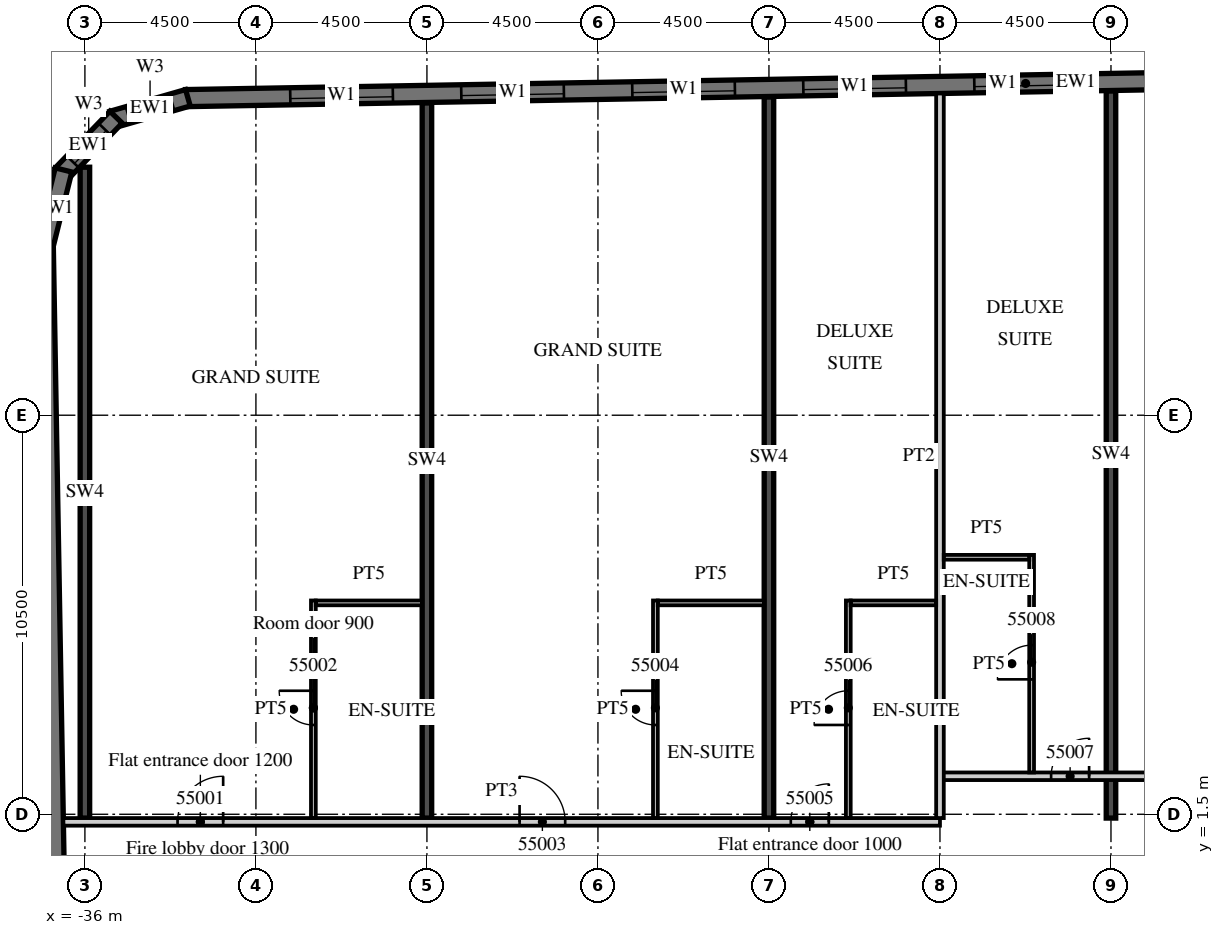
"""IFC4 building model, lengths in metres.
Left out: names, types, materials, properties, quantities, classifications, styles, units other than length and angle.
Written with IfcOpenShell. Run it as: python <this file> out.ifc"""

import sys

from ifc_helpers import new_model, si_unit, direction, frame, frame_2d, origin, place, context, subcontext, project, spatial, polyline, rectangle, outline, extrude, element, fill, save


model = new_model("IFC4")
c1 = context("Model", 3, precision=1e-05, world=origin(), true_north=direction((0.0, 1.0)))
c2 = subcontext(c1, "Body", "Model", "MODEL_VIEW")
j1 = project(units=[si_unit("LENGTHUNIT", "METRE"), si_unit("PLANEANGLEUNIT", "RADIAN")], contexts=[c1])
p1 = place(None, origin())
s1 = spatial("IfcSite", under=j1, at=p1, CompositionType="ELEMENT")
p2 = place(p1, origin())
s2 = spatial("IfcBuilding", under=s1, at=p2, CompositionType="ELEMENT")
p3 = place(p2, frame((0.0, 0.0, 227.6)))
s3 = spatial("IfcBuildingStorey", under=s2, at=p3, CompositionType="ELEMENT", Elevation=227.6)
p4 = place(p3, frame((-36.0, 1.4, 0.0), z_axis=(0.0, 0.0, 1.0), x_axis=(0.0, 1.0, 0.0)))
e1 = element("IfcWall", 1, at=p4, inside=s3, PredefinedType="SHEAR", context=c2, shape_type="SweptSolid", body=[
    extrude(rectangle(XDim=17.125, YDim=0.25, at=frame_2d((8.563, 0.0))), origin(), (0.0, 0.0, 1.0), 3.3),
])
p5 = place(p3, frame((-27.0, 1.4, 0.0), z_axis=(0.0, 0.0, 1.0), x_axis=(0.0, 1.0, 0.0)))
e2 = element("IfcWall", 2, at=p5, inside=s3, PredefinedType="SHEAR", context=c2, shape_type="SweptSolid", body=[
    extrude(rectangle(XDim=18.817, YDim=0.25, at=frame_2d((9.409, 0.0))), origin(), (0.0, 0.0, 1.0), 3.3),
])
p6 = place(p3, frame((-18.0, 1.4, 0.0), z_axis=(0.0, 0.0, 1.0), x_axis=(0.0, 1.0, 0.0)))
e3 = element("IfcWall", 3, at=p6, inside=s3, PredefinedType="SHEAR", context=c2, shape_type="SweptSolid", body=[
    extrude(rectangle(XDim=18.974, YDim=0.25, at=frame_2d((9.487, 0.0))), origin(), (0.0, 0.0, 1.0), 3.3),
])
p7 = place(p3, frame((-9.0, 1.4, 0.0), z_axis=(0.0, 0.0, 1.0), x_axis=(0.0, 1.0, 0.0)))
e4 = element("IfcWall", 4, at=p7, inside=s3, PredefinedType="SHEAR", context=c2, shape_type="SweptSolid", body=[
    extrude(rectangle(XDim=19.132, YDim=0.25, at=frame_2d((9.566, 0.0))), origin(), (0.0, 0.0, 1.0), 3.3),
])
p8 = place(p3, frame((-37.057, 16.503, 0.0), z_axis=(0.0, 0.0, 1.0), x_axis=(0.017452279857, -0.999847697366, 0.0)))
e5 = element("IfcWall", 5, at=p8, inside=s3, PredefinedType="SOLIDWALL", context=c2, shape_type="SweptSolid", body=[
    extrude(rectangle(XDim=33.0, YDim=0.45, at=frame_2d((16.5, 0.0))), origin(), (0.0, 0.0, 1.0), 3.02),
])
p9 = place(p3, frame((13.504, 21.161, 0.0), z_axis=(0.0, 0.0, 1.0), x_axis=(-0.999847763257, -0.017448504532, 0.0)))
e6 = element("IfcWall", 6, at=p9, inside=s3, PredefinedType="SOLIDWALL", context=c2, shape_type="SweptSolid", body=[
    extrude(rectangle(XDim=46.859, YDim=0.45, at=frame_2d((23.43, 0.0))), origin(), (0.0, 0.0, 1.0), 3.02),
])
p10 = place(p9, frame((0.9, 0.0, 0.45)))
e7 = element("IfcOpeningElement", 7, at=p10, cuts=e6, PredefinedType="OPENING", context=c2, shape_type="SweptSolid", body=[
    extrude(rectangle(XDim=2.7, YDim=2.25, at=frame_2d((1.35, 1.125))), frame((0.0, 0.235, 0.0), z_axis=(0.0, -1.0, 0.0), x_axis=(1.0, 0.0, 0.0)), (0.0, 0.0, 1.0), 0.47),
])
p11 = place(p9, frame((5.401, 0.0, 0.45)))
e8 = element("IfcOpeningElement", 8, at=p11, cuts=e6, PredefinedType="OPENING", context=c2, shape_type="SweptSolid", body=[
    extrude(rectangle(XDim=2.7, YDim=2.25, at=frame_2d((1.35, 1.125))), frame((0.0, 0.235, 0.0), z_axis=(0.0, -1.0, 0.0), x_axis=(1.0, 0.0, 0.0)), (0.0, 0.0, 1.0), 0.47),
])
p12 = place(p9, frame((9.902, 0.0, 0.45)))
e9 = element("IfcOpeningElement", 9, at=p12, cuts=e6, PredefinedType="OPENING", context=c2, shape_type="SweptSolid", body=[
    extrude(rectangle(XDim=2.7, YDim=2.25, at=frame_2d((1.35, 1.125))), frame((0.0, 0.235, 0.0), z_axis=(0.0, -1.0, 0.0), x_axis=(1.0, 0.0, 0.0)), (0.0, 0.0, 1.0), 0.47),
])
p13 = place(p9, frame((14.402, 0.0, 0.45)))
e10 = element("IfcOpeningElement", 10, at=p13, cuts=e6, PredefinedType="OPENING", context=c2, shape_type="SweptSolid", body=[
    extrude(rectangle(XDim=2.7, YDim=2.25, at=frame_2d((1.35, 1.125))), frame((0.0, 0.235, 0.0), z_axis=(0.0, -1.0, 0.0), x_axis=(1.0, 0.0, 0.0)), (0.0, 0.0, 1.0), 0.47),
])
p14 = place(p9, frame((18.903, 0.0, 0.45)))
e11 = element("IfcOpeningElement", 11, at=p14, cuts=e6, PredefinedType="OPENING", context=c2, shape_type="SweptSolid", body=[
    extrude(rectangle(XDim=2.7, YDim=2.25, at=frame_2d((1.35, 1.125))), frame((0.0, 0.235, 0.0), z_axis=(0.0, -1.0, 0.0), x_axis=(1.0, 0.0, 0.0)), (0.0, 0.0, 1.0), 0.47),
])
p15 = place(p9, frame((23.404, 0.0, 0.45)))
e12 = element("IfcOpeningElement", 12, at=p15, cuts=e6, PredefinedType="OPENING", context=c2, shape_type="SweptSolid", body=[
    extrude(rectangle(XDim=2.7, YDim=2.25, at=frame_2d((1.35, 1.125))), frame((0.0, 0.235, 0.0), z_axis=(0.0, -1.0, 0.0), x_axis=(1.0, 0.0, 0.0)), (0.0, 0.0, 1.0), 0.47),
])
p16 = place(p9, frame((27.904, 0.0, 0.45)))
e13 = element("IfcOpeningElement", 13, at=p16, cuts=e6, PredefinedType="OPENING", context=c2, shape_type="SweptSolid", body=[
    extrude(rectangle(XDim=2.7, YDim=2.25, at=frame_2d((1.35, 1.125))), frame((0.0, 0.235, 0.0), z_axis=(0.0, -1.0, 0.0), x_axis=(1.0, 0.0, 0.0)), (0.0, 0.0, 1.0), 0.47),
])
p17 = place(p9, frame((32.405, 0.0, 0.45)))
e14 = element("IfcOpeningElement", 14, at=p17, cuts=e6, PredefinedType="OPENING", context=c2, shape_type="SweptSolid", body=[
    extrude(rectangle(XDim=2.7, YDim=2.25, at=frame_2d((1.35, 1.125))), frame((0.0, 0.235, 0.0), z_axis=(0.0, -1.0, 0.0), x_axis=(1.0, 0.0, 0.0)), (0.0, 0.0, 1.0), 0.47),
])
p18 = place(p9, frame((36.906, 0.0, 0.45)))
e15 = element("IfcOpeningElement", 15, at=p18, cuts=e6, PredefinedType="OPENING", context=c2, shape_type="SweptSolid", body=[
    extrude(rectangle(XDim=2.7, YDim=2.25, at=frame_2d((1.35, 1.125))), frame((0.0, 0.235, 0.0), z_axis=(0.0, -1.0, 0.0), x_axis=(1.0, 0.0, 0.0)), (0.0, 0.0, 1.0), 0.47),
])
p19 = place(p9, frame((41.406, 0.0, 0.45)))
e16 = element("IfcOpeningElement", 16, at=p19, cuts=e6, PredefinedType="OPENING", context=c2, shape_type="SweptSolid", body=[
    extrude(rectangle(XDim=2.7, YDim=2.25, at=frame_2d((1.35, 1.125))), frame((0.0, 0.235, 0.0), z_axis=(0.0, -1.0, 0.0), x_axis=(1.0, 0.0, 0.0)), (0.0, 0.0, 1.0), 0.47),
])
p20 = place(p3, frame((-33.29, 20.352, 0.0), z_axis=(0.0, 0.0, 1.0), x_axis=(-0.961247584925, -0.275686562016, 0.0)))
e17 = element("IfcWall", 17, at=p20, inside=s3, PredefinedType="SOLIDWALL", context=c2, shape_type="SweptSolid", body=[
    extrude(outline(polyline([(0.0, -0.225), (2.071, -0.225), (1.95, 0.225), (0.121, 0.225), (0.0, -0.225)])), origin(), (0.0, 0.0, 1.0), 3.02),
])
p21 = place(p20, frame((0.435, 0.0, 0.45)))
e18 = element("IfcOpeningElement", 18, at=p21, cuts=e17, PredefinedType="OPENING", context=c2, shape_type="SweptSolid", body=[
    extrude(rectangle(XDim=1.2, YDim=2.25, at=frame_2d((0.6, 1.125))), frame((0.0, 0.235, 0.0), z_axis=(0.0, -1.0, 0.0), x_axis=(1.0, 0.0, 0.0)), (0.0, 0.0, 1.0), 0.47),
])
p22 = place(p3, frame((-35.181, 19.842, 0.0), z_axis=(0.0, 0.0, 1.0), x_axis=(-0.694678672846, -0.719320193998, 0.0)))
e19 = element("IfcWall", 19, at=p22, inside=s3, PredefinedType="SOLIDWALL", context=c2, shape_type="SweptSolid", body=[
    extrude(outline(polyline([(0.0, -0.225), (2.071, -0.225), (1.95, 0.225), (0.121, 0.225), (0.0, -0.225)])), origin(), (0.0, 0.0, 1.0), 3.02),
])
p23 = place(p22, frame((0.435, 0.0, 0.45)))
e20 = element("IfcOpeningElement", 20, at=p23, cuts=e19, PredefinedType="OPENING", context=c2, shape_type="SweptSolid", body=[
    extrude(rectangle(XDim=1.2, YDim=2.25, at=frame_2d((0.6, 1.125))), frame((0.0, 0.235, 0.0), z_axis=(0.0, -1.0, 0.0), x_axis=(1.0, 0.0, 0.0)), (0.0, 0.0, 1.0), 0.47),
])
p24 = place(p3, frame((-36.563, 18.454, 0.0), z_axis=(0.0, 0.0, 1.0), x_axis=(-0.241869623482, -0.970308757683, 0.0)))
e21 = element("IfcWall", 21, at=p24, inside=s3, PredefinedType="SOLIDWALL", context=c2, shape_type="SweptSolid", body=[
    extrude(outline(polyline([(-0.0, -0.225), (2.07, -0.225), (1.95, 0.225), (0.12, 0.225), (-0.0, -0.225)])), origin(), (0.0, 0.0, 1.0), 3.02),
])
p25 = place(p3, frame((-36.566, 1.3, 0.0), z_axis=(0.0, 0.0, 1.0), x_axis=(1.0, 0.0, 0.0)))
e22 = element("IfcWall", 22, at=p25, inside=s3, PredefinedType="PARTITIONING", context=c2, shape_type="SweptSolid", body=[
    extrude(rectangle(XDim=23.066, YDim=0.2, at=frame_2d((11.533, 0.0))), origin(), (0.0, 0.0, 1.0), 3.02),
])
p26 = place(p25, frame((3.004, 0.0, 0.0)))
e23 = element("IfcOpeningElement", 23, at=p26, cuts=e22, PredefinedType="OPENING", context=c2, shape_type="SweptSolid", body=[
    extrude(rectangle(XDim=1.2, YDim=2.1, at=frame_2d((0.6, 1.05))), frame((0.0, 0.11, 0.0), z_axis=(0.0, -1.0, 0.0), x_axis=(1.0, 0.0, 0.0)), (0.0, 0.0, 1.0), 0.22),
])
p27 = place(p25, frame((12.004, 0.0, 0.0)))
e24 = element("IfcOpeningElement", 24, at=p27, cuts=e22, PredefinedType="OPENING", context=c2, shape_type="SweptSolid", body=[
    extrude(rectangle(XDim=1.2, YDim=2.1, at=frame_2d((0.6, 1.05))), frame((0.0, 0.11, 0.0), z_axis=(0.0, -1.0, 0.0), x_axis=(1.0, 0.0, 0.0)), (0.0, 0.0, 1.0), 0.22),
])
p28 = place(p25, frame((19.141, 0.0, 0.0)))
e25 = element("IfcOpeningElement", 25, at=p28, cuts=e22, PredefinedType="OPENING", context=c2, shape_type="SweptSolid", body=[
    extrude(rectangle(XDim=1.0, YDim=2.1, at=frame_2d((0.5, 1.05))), frame((0.0, 0.11, 0.0), z_axis=(0.0, -1.0, 0.0), x_axis=(1.0, 0.0, 0.0)), (0.0, 0.0, 1.0), 0.22),
])
p29 = place(p3, frame((-13.5, 2.5, 0.0), z_axis=(0.0, 0.0, 1.0), x_axis=(1.0, 0.0, 0.0)))
e26 = element("IfcWall", 26, at=p29, inside=s3, PredefinedType="PARTITIONING", context=c2, shape_type="SweptSolid", body=[
    extrude(rectangle(XDim=27.0, YDim=0.2, at=frame_2d((13.5, 0.0))), origin(), (0.0, 0.0, 1.0), 3.02),
])
p30 = place(p29, frame((2.925, 0.0, 0.0)))
e27 = element("IfcOpeningElement", 27, at=p30, cuts=e26, PredefinedType="OPENING", context=c2, shape_type="SweptSolid", body=[
    extrude(rectangle(XDim=1.0, YDim=2.1, at=frame_2d((0.5, 1.05))), frame((0.0, 0.11, 0.0), z_axis=(0.0, -1.0, 0.0), x_axis=(1.0, 0.0, 0.0)), (0.0, 0.0, 1.0), 0.22),
])
p31 = place(p29, frame((6.938, 0.0, 0.0)))
e28 = element("IfcOpeningElement", 28, at=p31, cuts=e26, PredefinedType="OPENING", context=c2, shape_type="SweptSolid", body=[
    extrude(rectangle(XDim=1.2, YDim=2.1, at=frame_2d((0.6, 1.05))), frame((0.0, 0.11, 0.0), z_axis=(0.0, -1.0, 0.0), x_axis=(1.0, 0.0, 0.0)), (0.0, 0.0, 1.0), 0.22),
])
p32 = place(p29, frame((14.075, 0.0, 0.0)))
e29 = element("IfcOpeningElement", 29, at=p32, cuts=e26, PredefinedType="OPENING", context=c2, shape_type="SweptSolid", body=[
    extrude(rectangle(XDim=1.0, YDim=2.1, at=frame_2d((0.5, 1.05))), frame((0.0, 0.11, 0.0), z_axis=(0.0, -1.0, 0.0), x_axis=(1.0, 0.0, 0.0)), (0.0, 0.0, 1.0), 0.22),
])
p33 = place(p29, frame((20.925, 0.0, 0.0)))
e30 = element("IfcOpeningElement", 30, at=p33, cuts=e26, PredefinedType="OPENING", context=c2, shape_type="SweptSolid", body=[
    extrude(rectangle(XDim=1.0, YDim=2.1, at=frame_2d((0.5, 1.05))), frame((0.0, 0.11, 0.0), z_axis=(0.0, -1.0, 0.0), x_axis=(1.0, 0.0, 0.0)), (0.0, 0.0, 1.0), 0.22),
])
p34 = place(p29, frame((25.425, 0.0, 0.0)))
e31 = element("IfcOpeningElement", 31, at=p34, cuts=e26, PredefinedType="OPENING", context=c2, shape_type="SweptSolid", body=[
    extrude(rectangle(XDim=1.0, YDim=2.1, at=frame_2d((0.5, 1.05))), frame((0.0, 0.11, 0.0), z_axis=(0.0, -1.0, 0.0), x_axis=(1.0, 0.0, 0.0)), (0.0, 0.0, 1.0), 0.22),
])
p35 = place(p3, frame((-29.988, 1.4, 0.0), z_axis=(0.0, 0.0, 1.0), x_axis=(0.0, 1.0, 0.0)))
e32 = element("IfcWall", 32, at=p35, inside=s3, PredefinedType="PARTITIONING", context=c2, shape_type="SweptSolid", body=[
    extrude(rectangle(XDim=5.725, YDim=0.125, at=frame_2d((2.863, 0.0))), origin(), (0.0, 0.0, 1.0), 3.02),
])
p36 = place(p35, frame((2.45, 0.0, 0.0)))
e33 = element("IfcOpeningElement", 33, at=p36, cuts=e32, PredefinedType="OPENING", context=c2, shape_type="SweptSolid", body=[
    extrude(rectangle(XDim=0.9, YDim=2.1, at=frame_2d((0.45, 1.05))), frame((0.0, 0.073, 0.0), z_axis=(0.0, -1.0, 0.0), x_axis=(1.0, 0.0, 0.0)), (0.0, 0.0, 1.0), 0.145),
])
p37 = place(p3, frame((-29.925, 7.062, 0.0), z_axis=(0.0, 0.0, 1.0), x_axis=(1.0, 0.0, 0.0)))
e34 = element("IfcWall", 34, at=p37, inside=s3, PredefinedType="PARTITIONING", context=c2, shape_type="SweptSolid", body=[
    extrude(rectangle(XDim=2.8, YDim=0.125, at=frame_2d((1.4, 0.0))), origin(), (0.0, 0.0, 1.0), 3.02),
])
p38 = place(p3, frame((-20.988, 1.4, 0.0), z_axis=(0.0, 0.0, 1.0), x_axis=(0.0, 1.0, 0.0)))
e35 = element("IfcWall", 35, at=p38, inside=s3, PredefinedType="PARTITIONING", context=c2, shape_type="SweptSolid", body=[
    extrude(rectangle(XDim=5.725, YDim=0.125, at=frame_2d((2.863, 0.0))), origin(), (0.0, 0.0, 1.0), 3.02),
])
p39 = place(p38, frame((2.45, 0.0, 0.0)))
e36 = element("IfcOpeningElement", 36, at=p39, cuts=e35, PredefinedType="OPENING", context=c2, shape_type="SweptSolid", body=[
    extrude(rectangle(XDim=0.9, YDim=2.1, at=frame_2d((0.45, 1.05))), frame((0.0, 0.073, 0.0), z_axis=(0.0, -1.0, 0.0), x_axis=(1.0, 0.0, 0.0)), (0.0, 0.0, 1.0), 0.145),
])
p40 = place(p3, frame((-20.925, 7.062, 0.0), z_axis=(0.0, 0.0, 1.0), x_axis=(1.0, 0.0, 0.0)))
e37 = element("IfcWall", 37, at=p40, inside=s3, PredefinedType="PARTITIONING", context=c2, shape_type="SweptSolid", body=[
    extrude(rectangle(XDim=2.8, YDim=0.125, at=frame_2d((1.4, 0.0))), origin(), (0.0, 0.0, 1.0), 3.02),
])
p41 = place(p3, frame((-13.5, 1.4, 0.0), z_axis=(0.0, 0.0, 1.0), x_axis=(0.0, 1.0, 0.0)))
e38 = element("IfcWall", 38, at=p41, inside=s3, PredefinedType="PARTITIONING", context=c2, shape_type="SweptSolid", body=[
    extrude(rectangle(XDim=19.065, YDim=0.2, at=frame_2d((9.533, 0.0))), origin(), (0.0, 0.0, 1.0), 3.02),
])
p42 = place(p3, frame((-15.912, 1.4, 0.0), z_axis=(0.0, 0.0, 1.0), x_axis=(0.0, 1.0, 0.0)))
e39 = element("IfcWall", 39, at=p42, inside=s3, PredefinedType="PARTITIONING", context=c2, shape_type="SweptSolid", body=[
    extrude(rectangle(XDim=5.725, YDim=0.125, at=frame_2d((2.863, 0.0))), origin(), (0.0, 0.0, 1.0), 3.02),
])
p43 = place(p42, frame((2.45, 0.0, 0.0)))
e40 = element("IfcOpeningElement", 40, at=p43, cuts=e39, PredefinedType="OPENING", context=c2, shape_type="SweptSolid", body=[
    extrude(rectangle(XDim=0.9, YDim=2.1, at=frame_2d((0.45, 1.05))), frame((0.0, 0.073, 0.0), z_axis=(0.0, -1.0, 0.0), x_axis=(1.0, 0.0, 0.0)), (0.0, 0.0, 1.0), 0.145),
])
p44 = place(p3, frame((-15.85, 7.062, 0.0), z_axis=(0.0, 0.0, 1.0), x_axis=(1.0, 0.0, 0.0)))
e41 = element("IfcWall", 41, at=p44, inside=s3, PredefinedType="PARTITIONING", context=c2, shape_type="SweptSolid", body=[
    extrude(rectangle(XDim=2.25, YDim=0.125, at=frame_2d((1.125, 0.0))), origin(), (0.0, 0.0, 1.0), 3.02),
])
p45 = place(p3, frame((-11.088, 2.6, 0.0), z_axis=(0.0, 0.0, 1.0), x_axis=(0.0, 1.0, 0.0)))
e42 = element("IfcWall", 42, at=p45, inside=s3, PredefinedType="PARTITIONING", context=c2, shape_type="SweptSolid", body=[
    extrude(rectangle(XDim=5.725, YDim=0.125, at=frame_2d((2.862, 0.0))), origin(), (0.0, 0.0, 1.0), 3.02),
])
p46 = place(p45, frame((2.45, 0.0, 0.0)))
e43 = element("IfcOpeningElement", 43, at=p46, cuts=e42, PredefinedType="OPENING", context=c2, shape_type="SweptSolid", body=[
    extrude(rectangle(XDim=0.9, YDim=2.1, at=frame_2d((0.45, 1.05))), frame((0.0, 0.073, 0.0), z_axis=(0.0, -1.0, 0.0), x_axis=(1.0, 0.0, 0.0)), (0.0, 0.0, 1.0), 0.145),
])
p47 = place(p3, frame((-13.4, 8.262, 0.0), z_axis=(0.0, 0.0, 1.0), x_axis=(1.0, 0.0, 0.0)))
e44 = element("IfcWall", 44, at=p47, inside=s3, PredefinedType="PARTITIONING", context=c2, shape_type="SweptSolid", body=[
    extrude(rectangle(XDim=2.25, YDim=0.125, at=frame_2d((1.125, 0.0))), origin(), (0.0, 0.0, 1.0), 3.02),
])
p48 = place(p15, origin())
e45 = element("IfcWindow", 45, at=p48, inside=s3, PartitioningType="SINGLE_PANEL", PredefinedType="WINDOW", context=c2, shape_type="SweptSolid", body=[
    extrude(rectangle(XDim=2.7, YDim=2.25, at=frame_2d((1.35, 1.125))), frame((0.0, 0.09, 0.0), z_axis=(0.0, -1.0, 0.0), x_axis=(1.0, 0.0, 0.0)), (0.0, 0.0, 1.0), 0.06),
])
fill(e12, e45)
p49 = place(p16, origin())
e46 = element("IfcWindow", 46, at=p49, inside=s3, PartitioningType="SINGLE_PANEL", PredefinedType="WINDOW", context=c2, shape_type="SweptSolid", body=[
    extrude(rectangle(XDim=2.7, YDim=2.25, at=frame_2d((1.35, 1.125))), frame((0.0, 0.09, 0.0), z_axis=(0.0, -1.0, 0.0), x_axis=(1.0, 0.0, 0.0)), (0.0, 0.0, 1.0), 0.06),
])
fill(e13, e46)
p50 = place(p17, origin())
e47 = element("IfcWindow", 47, at=p50, inside=s3, PartitioningType="SINGLE_PANEL", PredefinedType="WINDOW", context=c2, shape_type="SweptSolid", body=[
    extrude(rectangle(XDim=2.7, YDim=2.25, at=frame_2d((1.35, 1.125))), frame((0.0, 0.09, 0.0), z_axis=(0.0, -1.0, 0.0), x_axis=(1.0, 0.0, 0.0)), (0.0, 0.0, 1.0), 0.06),
])
fill(e14, e47)
p51 = place(p18, origin())
e48 = element("IfcWindow", 48, at=p51, inside=s3, PartitioningType="SINGLE_PANEL", PredefinedType="WINDOW", context=c2, shape_type="SweptSolid", body=[
    extrude(rectangle(XDim=2.7, YDim=2.25, at=frame_2d((1.35, 1.125))), frame((0.0, 0.09, 0.0), z_axis=(0.0, -1.0, 0.0), x_axis=(1.0, 0.0, 0.0)), (0.0, 0.0, 1.0), 0.06),
])
fill(e15, e48)
p52 = place(p19, origin())
e49 = element("IfcWindow", 49, at=p52, inside=s3, PartitioningType="SINGLE_PANEL", PredefinedType="WINDOW", context=c2, shape_type="SweptSolid", body=[
    extrude(rectangle(XDim=2.7, YDim=2.25, at=frame_2d((1.35, 1.125))), frame((0.0, 0.09, 0.0), z_axis=(0.0, -1.0, 0.0), x_axis=(1.0, 0.0, 0.0)), (0.0, 0.0, 1.0), 0.06),
])
fill(e16, e49)
p53 = place(p21, origin())
e50 = element("IfcWindow", 50, at=p53, inside=s3, PartitioningType="SINGLE_PANEL", PredefinedType="WINDOW", context=c2, shape_type="SweptSolid", body=[
    extrude(rectangle(XDim=1.2, YDim=2.25, at=frame_2d((0.6, 1.125))), frame((0.0, 0.09, 0.0), z_axis=(0.0, -1.0, 0.0), x_axis=(1.0, 0.0, 0.0)), (0.0, 0.0, 1.0), 0.06),
])
fill(e18, e50)
p54 = place(p23, origin())
e51 = element("IfcWindow", 51, at=p54, inside=s3, PartitioningType="SINGLE_PANEL", PredefinedType="WINDOW", context=c2, shape_type="SweptSolid", body=[
    extrude(rectangle(XDim=1.2, YDim=2.25, at=frame_2d((0.6, 1.125))), frame((0.0, 0.09, 0.0), z_axis=(0.0, -1.0, 0.0), x_axis=(1.0, 0.0, 0.0)), (0.0, 0.0, 1.0), 0.06),
])
fill(e20, e51)
p55 = place(p26, origin())
e52 = element("IfcDoor", 52, at=p55, inside=s3, OperationType="SINGLE_SWING_RIGHT", PredefinedType="DOOR", context=c2, shape_type="SweptSolid", body=[
    extrude(rectangle(XDim=1.2, YDim=2.1, at=frame_2d((0.6, 1.05))), frame((0.0, 0.025, 0.0), z_axis=(0.0, -1.0, 0.0), x_axis=(1.0, 0.0, 0.0)), (0.0, 0.0, 1.0), 0.05),
])
fill(e23, e52)
p56 = place(p36, origin())
e53 = element("IfcDoor", 53, at=p56, inside=s3, OperationType="SINGLE_SWING_RIGHT", PredefinedType="DOOR", context=c2, shape_type="SweptSolid", body=[
    extrude(rectangle(XDim=0.9, YDim=2.1, at=frame_2d((0.45, 1.05))), frame((0.0, 0.025, 0.0), z_axis=(0.0, -1.0, 0.0), x_axis=(1.0, 0.0, 0.0)), (0.0, 0.0, 1.0), 0.05),
])
fill(e33, e53)
p57 = place(p27, origin())
e54 = element("IfcDoor", 54, at=p57, inside=s3, OperationType="SINGLE_SWING_LEFT", PredefinedType="DOOR", context=c2, shape_type="SweptSolid", body=[
    extrude(rectangle(XDim=1.2, YDim=2.1, at=frame_2d((0.6, 1.05))), frame((0.0, 0.025, 0.0), z_axis=(0.0, -1.0, 0.0), x_axis=(1.0, 0.0, 0.0)), (0.0, 0.0, 1.0), 0.05),
])
fill(e24, e54)
p58 = place(p39, origin())
e55 = element("IfcDoor", 55, at=p58, inside=s3, OperationType="SINGLE_SWING_RIGHT", PredefinedType="DOOR", context=c2, shape_type="SweptSolid", body=[
    extrude(rectangle(XDim=0.9, YDim=2.1, at=frame_2d((0.45, 1.05))), frame((0.0, 0.025, 0.0), z_axis=(0.0, -1.0, 0.0), x_axis=(1.0, 0.0, 0.0)), (0.0, 0.0, 1.0), 0.05),
])
fill(e36, e55)
p59 = place(p28, origin())
e56 = element("IfcDoor", 56, at=p59, inside=s3, OperationType="SINGLE_SWING_RIGHT", PredefinedType="DOOR", context=c2, shape_type="SweptSolid", body=[
    extrude(rectangle(XDim=1.0, YDim=2.1, at=frame_2d((0.5, 1.05))), frame((0.0, 0.025, 0.0), z_axis=(0.0, -1.0, 0.0), x_axis=(1.0, 0.0, 0.0)), (0.0, 0.0, 1.0), 0.05),
])
fill(e25, e56)
p60 = place(p43, origin())
e57 = element("IfcDoor", 57, at=p60, inside=s3, OperationType="SINGLE_SWING_LEFT", PredefinedType="DOOR", context=c2, shape_type="SweptSolid", body=[
    extrude(rectangle(XDim=0.9, YDim=2.1, at=frame_2d((0.45, 1.05))), frame((0.0, 0.025, 0.0), z_axis=(0.0, -1.0, 0.0), x_axis=(1.0, 0.0, 0.0)), (0.0, 0.0, 1.0), 0.05),
])
fill(e40, e57)
p61 = place(p30, origin())
e58 = element("IfcDoor", 58, at=p61, inside=s3, OperationType="SINGLE_SWING_RIGHT", PredefinedType="DOOR", context=c2, shape_type="SweptSolid", body=[
    extrude(rectangle(XDim=1.0, YDim=2.1, at=frame_2d((0.5, 1.05))), frame((0.0, 0.025, 0.0), z_axis=(0.0, -1.0, 0.0), x_axis=(1.0, 0.0, 0.0)), (0.0, 0.0, 1.0), 0.05),
])
fill(e27, e58)
p62 = place(p46, origin())
e59 = element("IfcDoor", 59, at=p62, inside=s3, OperationType="SINGLE_SWING_LEFT", PredefinedType="DOOR", context=c2, shape_type="SweptSolid", body=[
    extrude(rectangle(XDim=0.9, YDim=2.1, at=frame_2d((0.45, 1.05))), frame((0.0, 0.025, 0.0), z_axis=(0.0, -1.0, 0.0), x_axis=(1.0, 0.0, 0.0)), (0.0, 0.0, 1.0), 0.05),
])
fill(e43, e59)
save(model, sys.argv[1])
